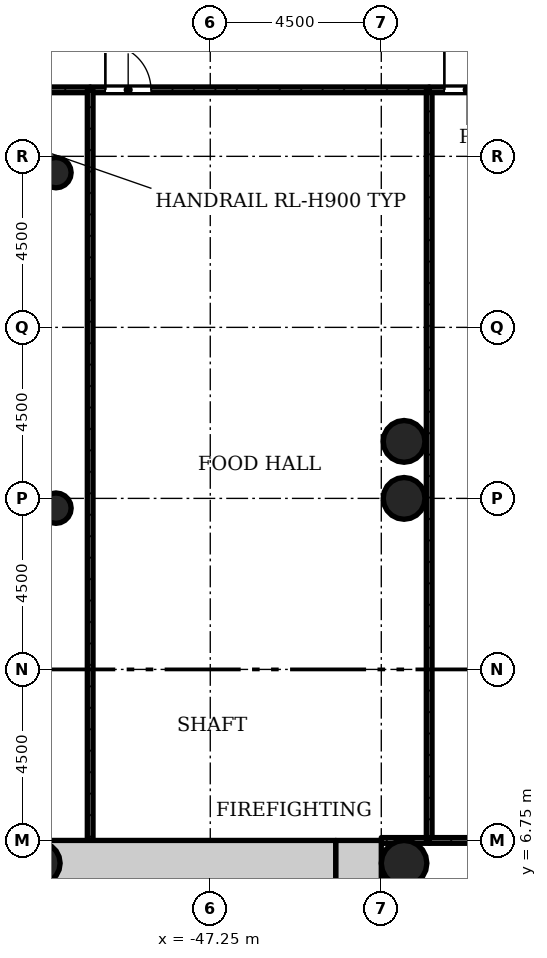
"""IFC4 building model, lengths in metres.
Left out: names, types, materials, properties, quantities, classifications, styles, units other than length and angle.
Written with IfcOpenShell. Run it as: python <this file> out.ifc"""

import sys

from ifc_helpers import new_model, si_unit, direction, frame, frame_2d, origin, origin_2d, place, context, subcontext, project, spatial, rectangle, hollow_circle, extrude, element, fill, save


model = new_model("IFC4")
c1 = context("Model", 3, precision=1e-05, world=origin(), true_north=direction((0.0, 1.0)))
c2 = subcontext(c1, "Body", "Model", "MODEL_VIEW")
j1 = project(units=[si_unit("LENGTHUNIT", "METRE"), si_unit("PLANEANGLEUNIT", "RADIAN")], contexts=[c1])
p1 = place(None, origin())
s1 = spatial("IfcSite", under=j1, at=p1, CompositionType="ELEMENT")
p2 = place(p1, origin())
s2 = spatial("IfcBuilding", under=s1, at=p2, CompositionType="ELEMENT")
p3 = place(p2, frame((0.0, 0.0, 6.0)))
s3 = spatial("IfcBuildingStorey", under=s2, at=p3, CompositionType="ELEMENT", Elevation=6.0)
p4 = place(p3, frame((-43.35, -5.55, 0.0), z_axis=(0.0, 0.0, 1.0), x_axis=(0.0, 1.0, 0.0)))
e1 = element("IfcWall", 1, at=p4, inside=s3, PredefinedType="SHEAR", context=c2, shape_type="SweptSolid", body=[
    extrude(rectangle(XDim=12.3, YDim=1.2, at=frame_2d((6.15, 0.0))), origin(), (0.0, 0.0, 1.0), 5.0),
])
p5 = place(p4, frame((4.65, 0.0, 0.0)))
e2 = element("IfcOpeningElement", 2, at=p5, cuts=e1, PredefinedType="OPENING", context=c2, shape_type="SweptSolid", body=[
    extrude(rectangle(XDim=1.8, YDim=2.1, at=frame_2d((0.9, 1.05))), frame((0.0, 0.61, 0.0), z_axis=(0.0, -1.0, 0.0), x_axis=(1.0, 0.0, 0.0)), (0.0, 0.0, 1.0), 1.22),
])
p6 = place(p3, frame((-43.95, 6.15, 0.0), z_axis=(0.0, 0.0, 1.0), x_axis=(-1.0, 0.0, 0.0)))
e3 = element("IfcWall", 3, at=p6, inside=s3, PredefinedType="SHEAR", context=c2, shape_type="SweptSolid", body=[
    extrude(rectangle(XDim=7.8, YDim=1.2, at=frame_2d((3.9, 0.0))), origin(), (0.0, 0.0, 1.0), 5.0),
])
for number, where, z_axis, x_axis in (
    (4, (-42.15, 15.75, 0.0), (0.0, 0.0, 1.0), (1.0, 0.0, 0.0)),
    (5, (-42.15, 17.25, 0.0), (0.0, 0.0, 1.0), (1.0, 0.0, 0.0)),
    (6, (-51.75, 6.15, 0.0), (0.0, 0.0, 1.0), (1.0, 0.0, 0.0)),
):
    element("IfcColumn", number, at=place(p3, frame(where, z_axis=z_axis, x_axis=x_axis)), inside=s3, PredefinedType="COLUMN", context=c2, shape_type="SweptSolid", body=[
        extrude(hollow_circle(Radius=0.55, WallThickness=0.04, at=origin_2d()), origin(), (0.0, 0.0, 1.0), 5.0),
    ])
p7 = place(p3, frame((-42.15, 6.15, 0.0), z_axis=(0.0, 0.0, 1.0), x_axis=(1.0, 0.0, 0.0)))
e7 = element("IfcColumn", 7, at=p7, inside=s3, PredefinedType="COLUMN", context=c2, shape_type="SweptSolid", body=[
    extrude(hollow_circle(Radius=0.6, WallThickness=0.045, at=origin_2d()), origin(), (0.0, 0.0, 1.0), 5.0),
])
for number, where, z_axis, x_axis in (
    (8, (-51.31, 15.493, 0.0), (0.0, 0.0, 1.0), (1.0, 0.0, 0.0)),
    (9, (-51.31, 24.321, 0.0), (0.0, 0.0, 1.0), (1.0, 0.0, 0.0)),
):
    element("IfcColumn", number, at=place(p3, frame(where, z_axis=z_axis, x_axis=x_axis)), inside=s3, PredefinedType="COLUMN", context=c2, shape_type="SweptSolid", body=[
        extrude(hollow_circle(Radius=0.4, WallThickness=0.028, at=origin_2d()), origin(), (0.0, 0.0, 1.0), 5.0),
    ])
p8 = place(p3, frame((-52.37, 26.5, 0.0), z_axis=(0.0, 0.0, 1.0), x_axis=(1.0, 0.0, 0.0)))
e10 = element("IfcWall", 10, at=p8, inside=s3, PredefinedType="PARTITIONING", context=c2, shape_type="SweptSolid", body=[
    extrude(rectangle(XDim=1.96, YDim=0.15, at=frame_2d((0.98, 0.0))), origin(), (0.0, 0.0, 1.0), 4.58),
])
p9 = place(p3, frame((-50.41, 26.5, 0.0), z_axis=(0.0, 0.0, 1.0), x_axis=(1.0, 0.0, 0.0)))
e11 = element("IfcWall", 11, at=p9, inside=s3, PredefinedType="PARTITIONING", context=c2, shape_type="SweptSolid", body=[
    extrude(rectangle(XDim=8.92, YDim=0.15, at=frame_2d((4.46, 0.0))), origin(), (0.0, 0.0, 1.0), 4.58),
])
p10 = place(p9, frame((0.4, 0.0, 0.0)))
e12 = element("IfcOpeningElement", 12, at=p10, cuts=e11, PredefinedType="OPENING", context=c2, shape_type="SweptSolid", body=[
    extrude(rectangle(XDim=1.2, YDim=2.1, at=frame_2d((0.6, 1.05))), frame((0.0, 0.085, 0.0), z_axis=(0.0, -1.0, 0.0), x_axis=(1.0, 0.0, 0.0)), (0.0, 0.0, 1.0), 0.17),
])
p11 = place(p3, frame((-41.49, 6.75, 0.0), z_axis=(0.0, 0.0, 1.0), x_axis=(-1.0, 0.0, 0.0)))
e13 = element("IfcWall", 13, at=p11, inside=s3, PredefinedType="PARTITIONING", context=c2, shape_type="SweptSolid", body=[
    extrude(rectangle(XDim=1.26, YDim=0.15, at=frame_2d((0.63, 0.0))), origin(), (0.0, 0.0, 1.0), 4.58),
])
for number, where, z_axis, x_axis in (
    (14, (-50.41, 6.75, 0.0), (0.0, 0.0, 1.0), (0.0, 1.0, 0.0)),
    (15, (-41.49, 26.5, 0.0), (0.0, 0.0, 1.0), (0.0, -1.0, 0.0)),
):
    element("IfcWall", number, at=place(p3, frame(where, z_axis=z_axis, x_axis=x_axis)), inside=s3, PredefinedType="PARTITIONING", context=c2, shape_type="SweptSolid", body=[
        extrude(rectangle(XDim=19.75, YDim=0.15, at=frame_2d((9.875, 0.0))), origin(), (0.0, 0.0, 1.0), 4.58),
    ])
p12 = place(p3, frame((-41.49, 26.5, 0.0), z_axis=(0.0, 0.0, 1.0), x_axis=(1.0, 0.0, 0.0)))
e16 = element("IfcWall", 16, at=p12, inside=s3, PredefinedType="PARTITIONING", context=c2, shape_type="SweptSolid", body=[
    extrude(rectangle(XDim=8.92, YDim=0.15, at=frame_2d((4.46, 0.0))), origin(), (0.0, 0.0, 1.0), 4.58),
])
p13 = place(p12, frame((0.4, 0.0, 0.0)))
e17 = element("IfcOpeningElement", 17, at=p13, cuts=e16, PredefinedType="OPENING", context=c2, shape_type="SweptSolid", body=[
    extrude(rectangle(XDim=1.2, YDim=2.1, at=frame_2d((0.6, 1.05))), frame((0.0, 0.085, 0.0), z_axis=(0.0, -1.0, 0.0), x_axis=(1.0, 0.0, 0.0)), (0.0, 0.0, 1.0), 0.17),
])
p14 = place(p3, frame((-32.57, 6.75, 0.0), z_axis=(0.0, 0.0, 1.0), x_axis=(-1.0, 0.0, 0.0)))
e18 = element("IfcWall", 18, at=p14, inside=s3, PredefinedType="PARTITIONING", context=c2, shape_type="SweptSolid", body=[
    extrude(rectangle(XDim=8.92, YDim=0.15, at=frame_2d((4.46, 0.0))), origin(), (0.0, 0.0, 1.0), 4.58),
])
p15 = place(p10, origin())
e19 = element("IfcDoor", 19, at=p15, inside=s3, OperationType="SINGLE_SWING_RIGHT", PredefinedType="DOOR", context=c2, shape_type="SweptSolid", body=[
    extrude(rectangle(XDim=1.2, YDim=2.1, at=frame_2d((0.6, 1.05))), frame((0.0, 0.025, 0.0), z_axis=(0.0, -1.0, 0.0), x_axis=(1.0, 0.0, 0.0)), (0.0, 0.0, 1.0), 0.05),
])
fill(e12, e19)
p16 = place(p13, origin())
e20 = element("IfcDoor", 20, at=p16, inside=s3, OperationType="SINGLE_SWING_RIGHT", PredefinedType="DOOR", context=c2, shape_type="SweptSolid", body=[
    extrude(rectangle(XDim=1.2, YDim=2.1, at=frame_2d((0.6, 1.05))), frame((0.0, 0.025, 0.0), z_axis=(0.0, -1.0, 0.0), x_axis=(1.0, 0.0, 0.0)), (0.0, 0.0, 1.0), 0.05),
])
fill(e17, e20)
save(model, sys.argv[1])
